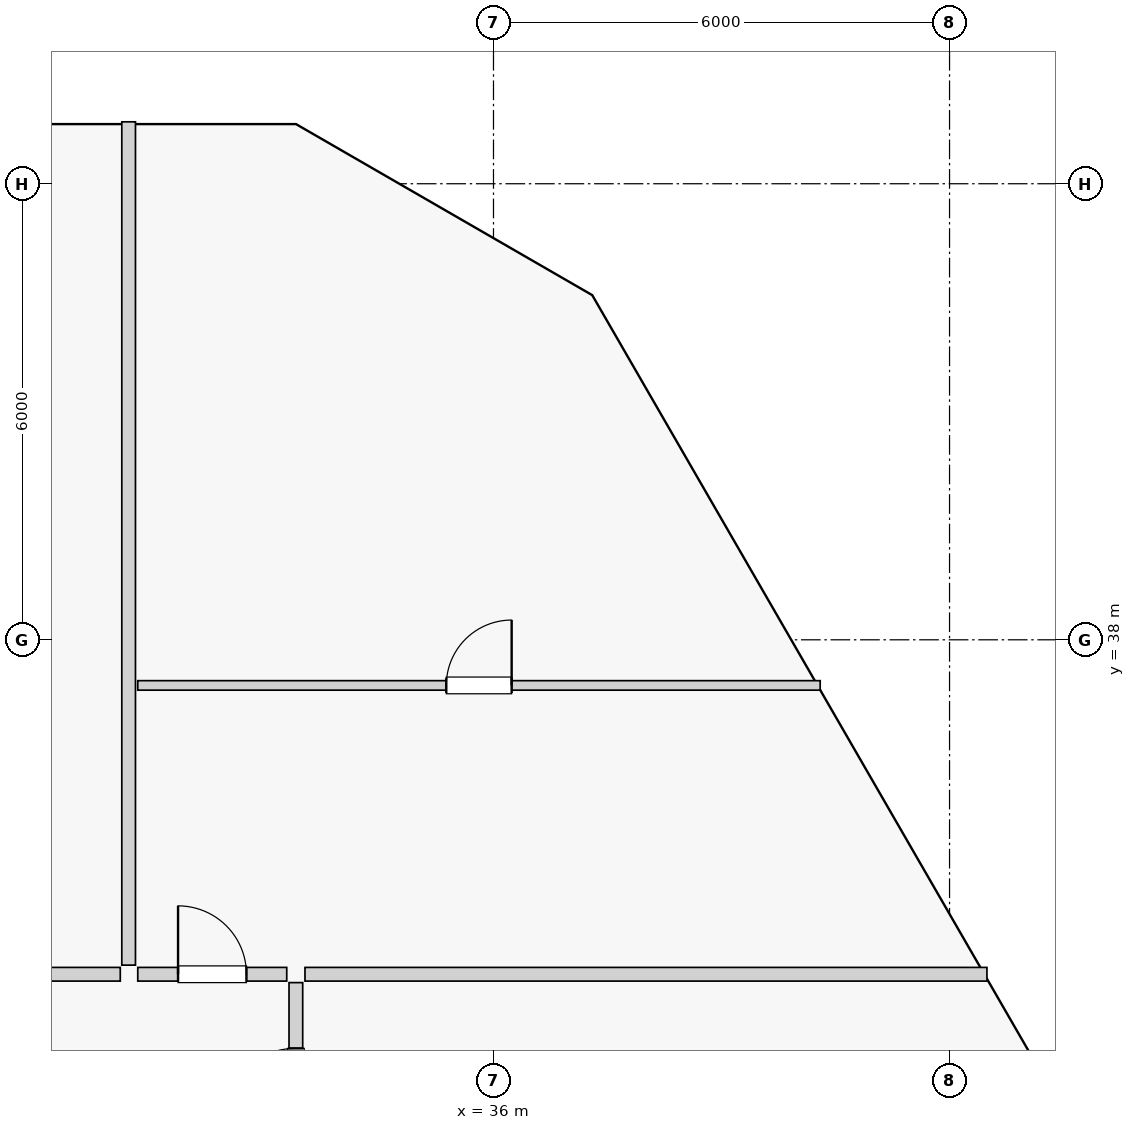
"""IFC4 building model, lengths in metres.
Left out: names, types, materials, properties, quantities, classifications, styles, units other than length and angle.
Written with IfcOpenShell. Run it as: python <this file> out.ifc"""

import sys

from ifc_helpers import new_model, si_unit, direction, frame, frame_2d, origin, place, context, subcontext, project, spatial, rectangle, extrude, source, transform, mapped, element, fill, save


model = new_model("IFC4")
c1 = context("Model", 3, precision=1e-05, world=origin(), true_north=direction((0.0, 1.0)))
c2 = subcontext(c1, "Body", "Model", "MODEL_VIEW")
j1 = project(units=[si_unit("LENGTHUNIT", "METRE"), si_unit("PLANEANGLEUNIT", "RADIAN")], contexts=[c1])
p1 = place(None, origin())
s1 = spatial("IfcSite", under=j1, at=p1, CompositionType="ELEMENT")
p2 = place(p1, origin())
s2 = spatial("IfcBuilding", under=s1, at=p2, CompositionType="ELEMENT")
p3 = place(p2, frame((0.0, 0.0, 22.8)))
s3 = spatial("IfcBuildingStorey", under=s2, at=p3, CompositionType="ELEMENT", Elevation=22.8)
p4 = place(p3, frame((31.2, 33.72, 0.0), z_axis=(0.0, 0.0, 1.0), x_axis=(0.0, 1.0, 0.0)))
e1 = element("IfcWall", 1, at=p4, inside=s3, PredefinedType="PARTITIONING", context=c2, shape_type="SweptSolid", body=[
    extrude(rectangle(XDim=11.095, YDim=0.18, at=frame_2d((5.547, 0.0))), origin(), (0.0, 0.0, 1.0), 4.25),
])
p5 = place(p3, frame((27.471, 33.6, 0.0), z_axis=(0.0, 0.0, 1.0), x_axis=(1.0, 0.0, 0.0)))
e2 = element("IfcWall", 2, at=p5, inside=s3, PredefinedType="PARTITIONING", context=c2, shape_type="SweptSolid", body=[
    extrude(rectangle(XDim=3.619, YDim=0.18, at=frame_2d((1.81, 0.0))), origin(), (0.0, 0.0, 1.0), 4.25),
])
p6 = place(p5, frame((1.31, 0.0, 0.0)))
e3 = element("IfcOpeningElement", 3, at=p6, cuts=e2, PredefinedType="OPENING", context=c2, shape_type="SweptSolid", body=[
    extrude(rectangle(XDim=1.0, YDim=2.01, at=frame_2d((0.5, 1.005))), frame((0.0, 0.1, 0.0), z_axis=(0.0, -1.0, 0.0), x_axis=(1.0, 0.0, 0.0)), (0.0, 0.0, 1.0), 0.2),
])
p7 = place(p3, frame((33.52, 33.6, 0.0), z_axis=(0.0, 0.0, 1.0), x_axis=(1.0, 0.0, 0.0)))
e4 = element("IfcWall", 4, at=p7, inside=s3, PredefinedType="PARTITIONING", context=c2, shape_type="SweptSolid", body=[
    extrude(rectangle(XDim=8.972, YDim=0.18, at=frame_2d((4.486, 0.0))), origin(), (0.0, 0.0, 1.0), 4.25),
])
p8 = place(p3, frame((33.4, 30.76, 0.0), z_axis=(0.0, 0.0, 1.0), x_axis=(0.0, 1.0, 0.0)))
e5 = element("IfcWall", 5, at=p8, inside=s3, PredefinedType="PARTITIONING", context=c2, shape_type="SweptSolid", body=[
    extrude(rectangle(XDim=2.73, YDim=0.18, at=frame_2d((1.365, 0.0))), origin(), (0.0, 0.0, 1.0), 4.25),
])
p9 = place(p8, frame((0.865, 0.0, 0.0)))
e6 = element("IfcOpeningElement", 6, at=p9, cuts=e5, PredefinedType="OPENING", context=c2, shape_type="SweptSolid", body=[
    extrude(rectangle(XDim=1.0, YDim=2.01, at=frame_2d((0.5, 1.005))), frame((0.0, 0.1, 0.0), z_axis=(0.0, -1.0, 0.0), x_axis=(1.0, 0.0, 0.0)), (0.0, 0.0, 1.0), 0.2),
])
p10 = place(p3, frame((31.32, 33.6, 0.0), z_axis=(0.0, 0.0, 1.0), x_axis=(1.0, 0.0, 0.0)))
e7 = element("IfcWall", 7, at=p10, inside=s3, PredefinedType="PARTITIONING", context=c2, shape_type="SweptSolid", body=[
    extrude(rectangle(XDim=1.96, YDim=0.18, at=frame_2d((0.98, 0.0))), origin(), (0.0, 0.0, 1.0), 4.25),
])
p11 = place(p10, frame((0.53, 0.0, 0.0)))
e8 = element("IfcOpeningElement", 8, at=p11, cuts=e7, PredefinedType="OPENING", context=c2, shape_type="SweptSolid", body=[
    extrude(rectangle(XDim=0.9, YDim=2.01, at=frame_2d((0.45, 1.005))), frame((0.0, 0.1, 0.0), z_axis=(0.0, -1.0, 0.0), x_axis=(1.0, 0.0, 0.0)), (0.0, 0.0, 1.0), 0.2),
])
p12 = place(p3, frame((31.32, 37.4, 0.0), z_axis=(0.0, 0.0, 1.0), x_axis=(1.0, 0.0, 0.0)))
e9 = element("IfcWall", 9, at=p12, inside=s3, PredefinedType="PARTITIONING", context=c2, shape_type="SweptSolid", body=[
    extrude(rectangle(XDim=8.978, YDim=0.125, at=frame_2d((4.489, 0.0))), origin(), (0.0, 0.0, 1.0), 4.25),
])
p13 = place(p12, frame((4.059, 0.0, 0.0)))
e10 = element("IfcOpeningElement", 10, at=p13, cuts=e9, PredefinedType="OPENING", context=c2, shape_type="SweptSolid", body=[
    extrude(rectangle(XDim=0.86, YDim=2.01, at=frame_2d((0.43, 1.005))), frame((0.0, 0.073, 0.0), z_axis=(0.0, -1.0, 0.0), x_axis=(1.0, 0.0, 0.0)), (0.0, 0.0, 1.0), 0.145),
])
m1 = source(origin(), c2, "Body", "SweptSolid", [
    extrude(rectangle(XDim=1.0, YDim=2.01, at=frame_2d((0.5, 1.005))), frame((0.0, 0.025, 0.0), z_axis=(0.0, -1.0, 0.0), x_axis=(1.0, 0.0, 0.0)), (0.0, 0.0, 1.0), 0.05),
])
p14 = place(p9, origin())
e11 = element("IfcDoor", 11, at=p14, inside=s3, OperationType="SINGLE_SWING_LEFT", PredefinedType="DOOR", context=c2, shape_type="MappedRepresentation", body=[
    mapped(m1, transform((0.0, 0.0, 0.0), scale=1.0)),
])
fill(e6, e11)
m2 = source(origin(), c2, "Body", "SweptSolid", [
    extrude(rectangle(XDim=0.9, YDim=2.01, at=frame_2d((0.45, 1.005))), frame((0.0, 0.025, 0.0), z_axis=(0.0, -1.0, 0.0), x_axis=(1.0, 0.0, 0.0)), (0.0, 0.0, 1.0), 0.05),
])
p15 = place(p11, origin())
e12 = element("IfcDoor", 12, at=p15, inside=s3, OperationType="SINGLE_SWING_LEFT", PredefinedType="DOOR", context=c2, shape_type="MappedRepresentation", body=[
    mapped(m2, transform((0.0, 0.0, 0.0), scale=1.0)),
])
fill(e8, e12)
m3 = source(origin(), c2, "Body", "SweptSolid", [
    extrude(rectangle(XDim=0.86, YDim=2.01, at=frame_2d((0.43, 1.005))), frame((0.0, 0.025, 0.0), z_axis=(0.0, -1.0, 0.0), x_axis=(1.0, 0.0, 0.0)), (0.0, 0.0, 1.0), 0.05),
])
p16 = place(p13, origin())
e13 = element("IfcDoor", 13, at=p16, inside=s3, OperationType="SINGLE_SWING_RIGHT", PredefinedType="DOOR", context=c2, shape_type="MappedRepresentation", body=[
    mapped(m3, transform((0.0, 0.0, 0.0), scale=1.0)),
])
fill(e10, e13)
save(model, sys.argv[1])
